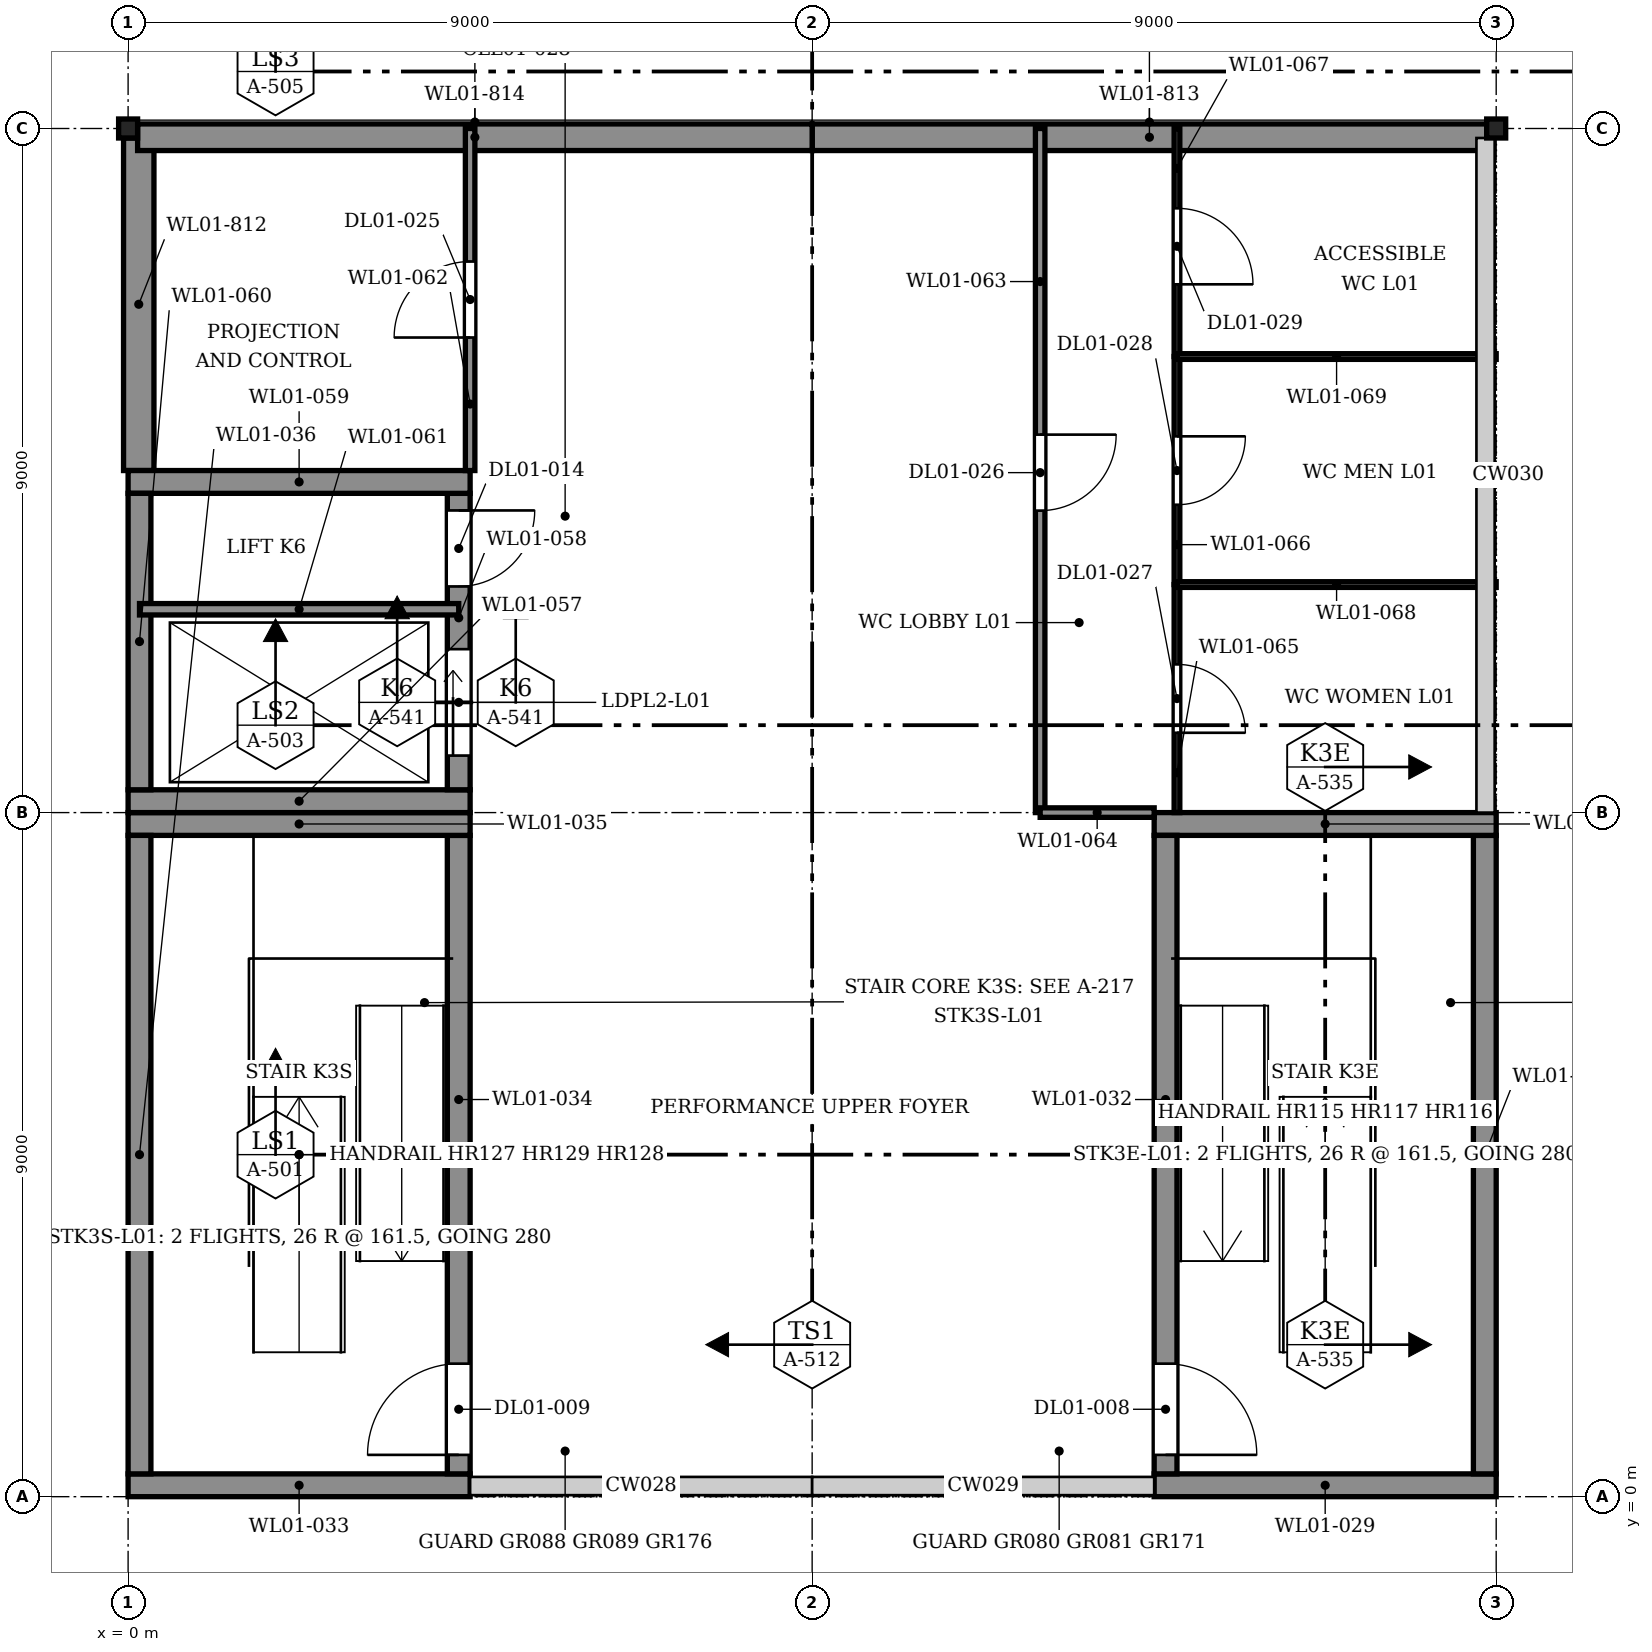
"""IFC4 building model, lengths in metres.
Left out: names, types, materials, properties, quantities, classifications, styles, units other than length and angle.
Written with IfcOpenShell. Run it as: python <this file> out.ifc"""

import sys

from ifc_helpers import new_model, si_unit, direction, frame, frame_2d, origin, origin_2d, place, context, subcontext, project, spatial, rectangle, hollow_rectangle, extrude, element, fill, save


model = new_model("IFC4")
c1 = context("Model", 3, precision=1e-05, world=origin(), true_north=direction((0.0, 1.0)))
c2 = subcontext(c1, "Body", "Model", "MODEL_VIEW")
j1 = project(units=[si_unit("LENGTHUNIT", "METRE"), si_unit("PLANEANGLEUNIT", "RADIAN")], contexts=[c1])
p1 = place(None, origin())
s1 = spatial("IfcSite", under=j1, at=p1, CompositionType="ELEMENT")
p2 = place(p1, origin())
s2 = spatial("IfcBuilding", under=s1, at=p2, CompositionType="ELEMENT")
p3 = place(p2, frame((0.0, 0.0, 5.0)))
s3 = spatial("IfcBuildingStorey", under=s2, at=p3, CompositionType="ELEMENT", Elevation=5.0)
for number, where, z_axis, x_axis in (
    (1, (0.0, 18.0, 0.0), (0.0, 0.0, 1.0), (1.0, 0.0, 0.0)),
    (2, (18.0, 18.0, 0.0), (0.0, 0.0, 1.0), (1.0, 0.0, 0.0)),
):
    element("IfcColumn", number, at=place(p3, frame(where, z_axis=z_axis, x_axis=x_axis)), inside=s3, PredefinedType="COLUMN", context=c2, shape_type="SweptSolid", body=[
        extrude(hollow_rectangle(XDim=0.25, YDim=0.25, WallThickness=0.01, InnerFilletRadius=0.015, OuterFilletRadius=0.025, at=origin_2d()), origin(), (0.0, 0.0, 1.0), 4.2),
    ])
p4 = place(p3, frame((0.14, 13.5, 0.0), z_axis=(0.0, 0.0, 1.0), x_axis=(0.0, 1.0, 0.0)))
e3 = element("IfcWall", 3, at=p4, inside=s3, PredefinedType="SOLIDWALL", context=c2, shape_type="SweptSolid", body=[
    extrude(rectangle(XDim=4.375, YDim=0.4, at=frame_2d((2.188, 0.0))), origin(), (0.0, 0.0, 1.0), 4.0),
])
for number, where, z_axis, x_axis in (
    (4, (9.0, 17.885, 0.0), (0.0, 0.0, 1.0), (1.0, 0.0, 0.0)),
    (5, (0.125, 17.885, 0.0), (0.0, 0.0, 1.0), (1.0, 0.0, 0.0)),
):
    element("IfcWall", number, at=place(p3, frame(where, z_axis=z_axis, x_axis=x_axis)), inside=s3, PredefinedType="SOLIDWALL", context=c2, shape_type="SweptSolid", body=[
        extrude(rectangle(XDim=8.875, YDim=0.35, at=frame_2d((4.438, 0.0))), origin(), (0.0, 0.0, 1.0), 2.824),
    ])
p5 = place(p3, frame((13.5, 0.15, 0.0), z_axis=(0.0, 0.0, 1.0), x_axis=(1.0, 0.0, 0.0)))
e6 = element("IfcWall", 6, at=p5, inside=s3, PredefinedType="SOLIDWALL", context=c2, shape_type="SweptSolid", body=[
    extrude(rectangle(XDim=4.5, YDim=0.3, at=frame_2d((2.25, 0.0))), origin(), (0.0, 0.0, 1.0), 4.2),
])
p6 = place(p3, frame((17.85, 0.3, 0.0), z_axis=(0.0, 0.0, 1.0), x_axis=(0.0, 1.0, 0.0)))
e7 = element("IfcWall", 7, at=p6, inside=s3, PredefinedType="SOLIDWALL", context=c2, shape_type="SweptSolid", body=[
    extrude(rectangle(XDim=8.4, YDim=0.3, at=frame_2d((4.2, 0.0))), origin(), (0.0, 0.0, 1.0), 4.2),
])
p7 = place(p3, frame((13.5, 8.85, 0.0), z_axis=(0.0, 0.0, 1.0), x_axis=(1.0, 0.0, 0.0)))
e8 = element("IfcWall", 8, at=p7, inside=s3, PredefinedType="SOLIDWALL", context=c2, shape_type="SweptSolid", body=[
    extrude(rectangle(XDim=4.5, YDim=0.3, at=frame_2d((2.25, 0.0))), origin(), (0.0, 0.0, 1.0), 4.2),
])
p8 = place(p3, frame((13.65, 0.3, 0.0), z_axis=(0.0, 0.0, 1.0), x_axis=(0.0, 1.0, 0.0)))
e9 = element("IfcWall", 9, at=p8, inside=s3, PredefinedType="SOLIDWALL", context=c2, shape_type="SweptSolid", body=[
    extrude(rectangle(XDim=8.4, YDim=0.3, at=frame_2d((4.2, 0.0))), origin(), (0.0, 0.0, 1.0), 4.2),
])
p9 = place(p8, frame((0.25, 0.0, 0.0)))
e10 = element("IfcOpeningElement", 10, at=p9, cuts=e9, PredefinedType="OPENING", context=c2, shape_type="SweptSolid", body=[
    extrude(rectangle(XDim=1.2, YDim=2.1, at=frame_2d((0.6, 1.05))), frame((0.0, 0.16, 0.0), z_axis=(0.0, -1.0, 0.0), x_axis=(1.0, 0.0, 0.0)), (0.0, 0.0, 1.0), 0.32),
])
p10 = place(p3, frame((0.0, 0.15, 0.0), z_axis=(0.0, 0.0, 1.0), x_axis=(1.0, 0.0, 0.0)))
e11 = element("IfcWall", 11, at=p10, inside=s3, PredefinedType="SOLIDWALL", context=c2, shape_type="SweptSolid", body=[
    extrude(rectangle(XDim=4.5, YDim=0.3, at=frame_2d((2.25, 0.0))), origin(), (0.0, 0.0, 1.0), 4.2),
])
p11 = place(p3, frame((4.35, 0.3, 0.0), z_axis=(0.0, 0.0, 1.0), x_axis=(0.0, 1.0, 0.0)))
e12 = element("IfcWall", 12, at=p11, inside=s3, PredefinedType="SOLIDWALL", context=c2, shape_type="SweptSolid", body=[
    extrude(rectangle(XDim=8.4, YDim=0.3, at=frame_2d((4.2, 0.0))), origin(), (0.0, 0.0, 1.0), 4.2),
])
p12 = place(p11, frame((0.25, 0.0, 0.0)))
e13 = element("IfcOpeningElement", 13, at=p12, cuts=e12, PredefinedType="OPENING", context=c2, shape_type="SweptSolid", body=[
    extrude(rectangle(XDim=1.2, YDim=2.1, at=frame_2d((0.6, 1.05))), frame((0.0, 0.16, 0.0), z_axis=(0.0, -1.0, 0.0), x_axis=(1.0, 0.0, 0.0)), (0.0, 0.0, 1.0), 0.32),
])
p13 = place(p3, frame((0.0, 8.85, 0.0), z_axis=(0.0, 0.0, 1.0), x_axis=(1.0, 0.0, 0.0)))
e14 = element("IfcWall", 14, at=p13, inside=s3, PredefinedType="SOLIDWALL", context=c2, shape_type="SweptSolid", body=[
    extrude(rectangle(XDim=4.5, YDim=0.3, at=frame_2d((2.25, 0.0))), origin(), (0.0, 0.0, 1.0), 4.2),
])
p14 = place(p3, frame((0.15, 0.3, 0.0), z_axis=(0.0, 0.0, 1.0), x_axis=(0.0, 1.0, 0.0)))
e15 = element("IfcWall", 15, at=p14, inside=s3, PredefinedType="SOLIDWALL", context=c2, shape_type="SweptSolid", body=[
    extrude(rectangle(XDim=8.4, YDim=0.3, at=frame_2d((4.2, 0.0))), origin(), (0.0, 0.0, 1.0), 4.2),
])
p15 = place(p3, frame((0.0, 9.15, 0.0), z_axis=(0.0, 0.0, 1.0), x_axis=(1.0, 0.0, 0.0)))
e16 = element("IfcWall", 16, at=p15, inside=s3, PredefinedType="SOLIDWALL", context=c2, shape_type="SweptSolid", body=[
    extrude(rectangle(XDim=4.5, YDim=0.3, at=frame_2d((2.25, 0.0))), origin(), (0.0, 0.0, 1.0), 4.2),
])
p16 = place(p3, frame((4.35, 9.3, 0.0), z_axis=(0.0, 0.0, 1.0), x_axis=(0.0, 1.0, 0.0)))
e17 = element("IfcWall", 17, at=p16, inside=s3, PredefinedType="SOLIDWALL", context=c2, shape_type="SweptSolid", body=[
    extrude(rectangle(XDim=3.9, YDim=0.3, at=frame_2d((1.95, 0.0))), origin(), (0.0, 0.0, 1.0), 4.2),
])
p17 = place(p16, frame((0.45, 0.0, 0.0)))
e18 = element("IfcOpeningElement", 18, at=p17, cuts=e17, PredefinedType="OPENING", context=c2, shape_type="SweptSolid", body=[
    extrude(rectangle(XDim=1.4, YDim=2.1, at=frame_2d((0.7, 1.05))), frame((0.0, 0.16, 0.0), z_axis=(0.0, -1.0, 0.0), x_axis=(1.0, 0.0, 0.0)), (0.0, 0.0, 1.0), 0.32),
])
p18 = place(p16, frame((2.675, 0.0, 0.0)))
e19 = element("IfcOpeningElement", 19, at=p18, cuts=e17, PredefinedType="OPENING", context=c2, shape_type="SweptSolid", body=[
    extrude(rectangle(XDim=1.0, YDim=2.1, at=frame_2d((0.5, 1.05))), frame((0.0, 0.16, 0.0), z_axis=(0.0, -1.0, 0.0), x_axis=(1.0, 0.0, 0.0)), (0.0, 0.0, 1.0), 0.32),
])
p19 = place(p3, frame((0.0, 13.35, 0.0), z_axis=(0.0, 0.0, 1.0), x_axis=(1.0, 0.0, 0.0)))
e20 = element("IfcWall", 20, at=p19, inside=s3, PredefinedType="SOLIDWALL", context=c2, shape_type="SweptSolid", body=[
    extrude(rectangle(XDim=4.5, YDim=0.3, at=frame_2d((2.25, 0.0))), origin(), (0.0, 0.0, 1.0), 4.2),
])
p20 = place(p3, frame((0.15, 9.3, 0.0), z_axis=(0.0, 0.0, 1.0), x_axis=(0.0, 1.0, 0.0)))
e21 = element("IfcWall", 21, at=p20, inside=s3, PredefinedType="SOLIDWALL", context=c2, shape_type="SweptSolid", body=[
    extrude(rectangle(XDim=3.9, YDim=0.3, at=frame_2d((1.95, 0.0))), origin(), (0.0, 0.0, 1.0), 4.2),
])
p21 = place(p3, frame((0.15, 11.675, 0.0), z_axis=(0.0, 0.0, 1.0), x_axis=(1.0, 0.0, 0.0)))
e22 = element("IfcWall", 22, at=p21, inside=s3, PredefinedType="SOLIDWALL", context=c2, shape_type="SweptSolid", body=[
    extrude(rectangle(XDim=4.2, YDim=0.15, at=frame_2d((2.1, 0.0))), origin(), (0.0, 0.0, 1.0), 4.2),
])
p22 = place(p2, origin())
s4 = spatial("IfcBuildingStorey", under=s2, at=p22, CompositionType="ELEMENT", Elevation=0.0)
p23 = place(p22, frame((4.5, 18.25, -0.038), z_axis=(0.0, 0.0, 1.0), x_axis=(1.0, 0.0, 0.0)))
e23 = element("IfcWall", 23, at=p23, inside=s4, PredefinedType="PARTITIONING", context=c2, shape_type="SweptSolid", body=[
    extrude(rectangle(XDim=7.5, YDim=0.3, at=frame_2d((3.75, 0.0))), origin(), (0.0, 0.0, 1.0), 12.428),
])
p24 = place(p23, frame((0.96, 0.0, 0.0)))
e24 = element("IfcOpeningElement", 24, at=p24, cuts=e23, PredefinedType="OPENING", context=c2, shape_type="SweptSolid", body=[
    extrude(rectangle(XDim=1.8, YDim=2.1, at=frame_2d((0.9, 1.05))), frame((0.0, 0.16, 0.0), z_axis=(0.0, -1.0, 0.0), x_axis=(1.0, 0.0, 0.0)), (0.0, 0.0, 1.0), 0.32),
])
p25 = place(p23, frame((4.76, 0.0, 0.0)))
e25 = element("IfcOpeningElement", 25, at=p25, cuts=e23, PredefinedType="OPENING", context=c2, shape_type="SweptSolid", body=[
    extrude(rectangle(XDim=1.8, YDim=2.1, at=frame_2d((0.9, 1.05))), frame((0.0, 0.16, 0.0), z_axis=(0.0, -1.0, 0.0), x_axis=(1.0, 0.0, 0.0)), (0.0, 0.0, 1.0), 0.32),
])
p26 = place(p22, frame((0.25, 18.25, -0.038), z_axis=(0.0, 0.0, 1.0), x_axis=(1.0, 0.0, 0.0)))
e26 = element("IfcWall", 26, at=p26, inside=s4, PredefinedType="PARTITIONING", context=c2, shape_type="SweptSolid", body=[
    extrude(rectangle(XDim=4.25, YDim=0.3, at=frame_2d((2.125, 0.0))), origin(), (0.0, 0.0, 1.0), 12.428),
])
p27 = place(p22, frame((12.0, 18.25, -0.038), z_axis=(0.0, 0.0, 1.0), x_axis=(1.0, 0.0, 0.0)))
e27 = element("IfcWall", 27, at=p27, inside=s4, PredefinedType="PARTITIONING", context=c2, shape_type="SweptSolid", body=[
    extrude(rectangle(XDim=1.8, YDim=0.3, at=frame_2d((0.9, 0.0))), origin(), (0.0, 0.0, 1.0), 12.428),
])
p28 = place(p22, frame((13.8, 18.25, -0.038), z_axis=(0.0, 0.0, 1.0), x_axis=(1.0, 0.0, 0.0)))
e28 = element("IfcWall", 28, at=p28, inside=s4, PredefinedType="PARTITIONING", context=c2, shape_type="SweptSolid", body=[
    extrude(rectangle(XDim=4.2, YDim=0.3, at=frame_2d((2.1, 0.0))), origin(), (0.0, 0.0, 1.0), 12.428),
])
p29 = place(p3, frame((4.5, 13.5, 0.0), z_axis=(0.0, 0.0, 1.0), x_axis=(0.0, 1.0, 0.0)))
e29 = element("IfcWall", 29, at=p29, inside=s3, PredefinedType="PARTITIONING", context=c2, shape_type="SweptSolid", body=[
    extrude(rectangle(XDim=4.5, YDim=0.125, at=frame_2d((2.25, 0.0))), origin(), (0.0, 0.0, 1.0), 2.824),
])
p30 = place(p29, frame((1.75, 0.0, 0.0)))
e30 = element("IfcOpeningElement", 30, at=p30, cuts=e29, PredefinedType="OPENING", context=c2, shape_type="SweptSolid", body=[
    extrude(rectangle(XDim=1.0, YDim=2.1, at=frame_2d((0.5, 1.05))), frame((0.0, 0.073, 0.0), z_axis=(0.0, -1.0, 0.0), x_axis=(1.0, 0.0, 0.0)), (0.0, 0.0, 1.0), 0.145),
])
p31 = place(p3, frame((12.0, 9.0, 0.0), z_axis=(0.0, 0.0, 1.0), x_axis=(0.0, 1.0, 0.0)))
e31 = element("IfcWall", 31, at=p31, inside=s3, PredefinedType="PARTITIONING", context=c2, shape_type="SweptSolid", body=[
    extrude(rectangle(XDim=9.0, YDim=0.125, at=frame_2d((4.5, 0.0))), origin(), (0.0, 0.0, 1.0), 2.824),
])
p32 = place(p31, frame((3.972, 0.0, 0.0)))
e32 = element("IfcOpeningElement", 32, at=p32, cuts=e31, PredefinedType="OPENING", context=c2, shape_type="SweptSolid", body=[
    extrude(rectangle(XDim=1.0, YDim=2.1, at=frame_2d((0.5, 1.05))), frame((0.0, 0.073, 0.0), z_axis=(0.0, -1.0, 0.0), x_axis=(1.0, 0.0, 0.0)), (0.0, 0.0, 1.0), 0.145),
])
p33 = place(p3, frame((12.0, 9.0, 0.0), z_axis=(0.0, 0.0, 1.0), x_axis=(1.0, 0.0, 0.0)))
e33 = element("IfcWall", 33, at=p33, inside=s3, PredefinedType="PARTITIONING", context=c2, shape_type="SweptSolid", body=[
    extrude(rectangle(XDim=1.5, YDim=0.125, at=frame_2d((0.75, 0.0))), origin(), (0.0, 0.0, 1.0), 3.208),
])
p34 = place(p3, frame((13.8, 9.0, 0.0), z_axis=(0.0, 0.0, 1.0), x_axis=(0.0, 1.0, 0.0)))
e34 = element("IfcWall", 34, at=p34, inside=s3, PredefinedType="PARTITIONING", context=c2, shape_type="SweptSolid", body=[
    extrude(rectangle(XDim=3.0, YDim=0.075, at=frame_2d((1.5, 0.0))), origin(), (0.0, 0.0, 1.0), 4.0),
])
p35 = place(p34, frame((1.05, 0.0, 0.0)))
e35 = element("IfcOpeningElement", 35, at=p35, cuts=e34, PredefinedType="OPENING", context=c2, shape_type="SweptSolid", body=[
    extrude(rectangle(XDim=0.9, YDim=2.1, at=frame_2d((0.45, 1.05))), frame((0.0, 0.047, 0.0), z_axis=(0.0, -1.0, 0.0), x_axis=(1.0, 0.0, 0.0)), (0.0, 0.0, 1.0), 0.095),
])
p36 = place(p3, frame((13.8, 12.0, 0.0), z_axis=(0.0, 0.0, 1.0), x_axis=(0.0, 1.0, 0.0)))
e36 = element("IfcWall", 36, at=p36, inside=s3, PredefinedType="PARTITIONING", context=c2, shape_type="SweptSolid", body=[
    extrude(rectangle(XDim=3.0, YDim=0.075, at=frame_2d((1.5, 0.0))), origin(), (0.0, 0.0, 1.0), 4.0),
])
p37 = place(p36, frame((1.05, 0.0, 0.0)))
e37 = element("IfcOpeningElement", 37, at=p37, cuts=e36, PredefinedType="OPENING", context=c2, shape_type="SweptSolid", body=[
    extrude(rectangle(XDim=0.9, YDim=2.1, at=frame_2d((0.45, 1.05))), frame((0.0, 0.047, 0.0), z_axis=(0.0, -1.0, 0.0), x_axis=(1.0, 0.0, 0.0)), (0.0, 0.0, 1.0), 0.095),
])
p38 = place(p3, frame((13.8, 15.0, 0.0), z_axis=(0.0, 0.0, 1.0), x_axis=(0.0, 1.0, 0.0)))
e38 = element("IfcWall", 38, at=p38, inside=s3, PredefinedType="PARTITIONING", context=c2, shape_type="SweptSolid", body=[
    extrude(rectangle(XDim=3.0, YDim=0.075, at=frame_2d((1.5, 0.0))), origin(), (0.0, 0.0, 1.0), 2.824),
])
p39 = place(p38, frame((0.95, 0.0, 0.0)))
e39 = element("IfcOpeningElement", 39, at=p39, cuts=e38, PredefinedType="OPENING", context=c2, shape_type="SweptSolid", body=[
    extrude(rectangle(XDim=1.0, YDim=2.1, at=frame_2d((0.5, 1.05))), frame((0.0, 0.047, 0.0), z_axis=(0.0, -1.0, 0.0), x_axis=(1.0, 0.0, 0.0)), (0.0, 0.0, 1.0), 0.095),
])
for number, where, z_axis, x_axis in (
    (40, (13.8, 12.0, 0.0), (0.0, 0.0, 1.0), (1.0, 0.0, 0.0)),
    (41, (13.8, 15.0, 0.0), (0.0, 0.0, 1.0), (1.0, 0.0, 0.0)),
):
    element("IfcWall", number, at=place(p3, frame(where, z_axis=z_axis, x_axis=x_axis)), inside=s3, PredefinedType="PARTITIONING", context=c2, shape_type="SweptSolid", body=[
        extrude(rectangle(XDim=4.2, YDim=0.075, at=frame_2d((2.1, 0.0))), origin(), (0.0, 0.0, 1.0), 3.3),
    ])
p40 = place(p9, frame((1.2, 0.0, 0.0), z_axis=(0.0, 0.0, 1.0), x_axis=(-1.0, 0.0, 0.0)))
e42 = element("IfcDoor", 42, at=p40, inside=s3, OperationType="SINGLE_SWING_LEFT", PredefinedType="DOOR", context=c2, shape_type="SweptSolid", body=[
    extrude(rectangle(XDim=1.2, YDim=2.1, at=frame_2d((0.6, 1.05))), frame((0.0, 0.025, 0.0), z_axis=(0.0, -1.0, 0.0), x_axis=(1.0, 0.0, 0.0)), (0.0, 0.0, 1.0), 0.05),
])
fill(e10, e42)
p41 = place(p12, origin())
e43 = element("IfcDoor", 43, at=p41, inside=s3, OperationType="SINGLE_SWING_RIGHT", PredefinedType="DOOR", context=c2, shape_type="SweptSolid", body=[
    extrude(rectangle(XDim=1.2, YDim=2.1, at=frame_2d((0.6, 1.05))), frame((0.0, 0.025, 0.0), z_axis=(0.0, -1.0, 0.0), x_axis=(1.0, 0.0, 0.0)), (0.0, 0.0, 1.0), 0.05),
])
fill(e13, e43)
p42 = place(p17, origin())
e44 = element("IfcDoor", 44, at=p42, inside=s3, OperationType="SLIDING_TO_LEFT", PredefinedType="DOOR", context=c2, shape_type="SweptSolid", body=[
    extrude(rectangle(XDim=1.4, YDim=2.1, at=frame_2d((0.7, 1.05))), frame((0.0, 0.025, 0.0), z_axis=(0.0, -1.0, 0.0), x_axis=(1.0, 0.0, 0.0)), (0.0, 0.0, 1.0), 0.05),
])
fill(e18, e44)
p43 = place(p18, frame((1.0, 0.0, 0.0), z_axis=(0.0, 0.0, 1.0), x_axis=(-1.0, 0.0, 0.0)))
e45 = element("IfcDoor", 45, at=p43, inside=s3, OperationType="SINGLE_SWING_RIGHT", PredefinedType="DOOR", context=c2, shape_type="SweptSolid", body=[
    extrude(rectangle(XDim=1.0, YDim=2.1, at=frame_2d((0.5, 1.05))), frame((0.0, 0.025, 0.0), z_axis=(0.0, -1.0, 0.0), x_axis=(1.0, 0.0, 0.0)), (0.0, 0.0, 1.0), 0.05),
])
fill(e19, e45)
p44 = place(p30, origin())
e46 = element("IfcDoor", 46, at=p44, inside=s3, OperationType="SINGLE_SWING_RIGHT", PredefinedType="DOOR", context=c2, shape_type="SweptSolid", body=[
    extrude(rectangle(XDim=1.0, YDim=2.1, at=frame_2d((0.5, 1.05))), frame((0.0, 0.025, 0.0), z_axis=(0.0, -1.0, 0.0), x_axis=(1.0, 0.0, 0.0)), (0.0, 0.0, 1.0), 0.05),
])
fill(e30, e46)
p45 = place(p32, frame((1.0, 0.0, 0.0), z_axis=(0.0, 0.0, 1.0), x_axis=(-1.0, 0.0, 0.0)))
e47 = element("IfcDoor", 47, at=p45, inside=s3, OperationType="SINGLE_SWING_RIGHT", PredefinedType="DOOR", context=c2, shape_type="SweptSolid", body=[
    extrude(rectangle(XDim=1.0, YDim=2.1, at=frame_2d((0.5, 1.05))), frame((0.0, 0.025, 0.0), z_axis=(0.0, -1.0, 0.0), x_axis=(1.0, 0.0, 0.0)), (0.0, 0.0, 1.0), 0.05),
])
fill(e32, e47)
p46 = place(p35, frame((0.9, 0.0, 0.0), z_axis=(0.0, 0.0, 1.0), x_axis=(-1.0, 0.0, 0.0)))
e48 = element("IfcDoor", 48, at=p46, inside=s3, OperationType="SINGLE_SWING_LEFT", PredefinedType="DOOR", context=c2, shape_type="SweptSolid", body=[
    extrude(rectangle(XDim=0.9, YDim=2.1, at=frame_2d((0.45, 1.05))), frame((0.0, 0.025, 0.0), z_axis=(0.0, -1.0, 0.0), x_axis=(1.0, 0.0, 0.0)), (0.0, 0.0, 1.0), 0.05),
])
fill(e35, e48)
p47 = place(p37, frame((0.9, 0.0, 0.0), z_axis=(0.0, 0.0, 1.0), x_axis=(-1.0, 0.0, 0.0)))
e49 = element("IfcDoor", 49, at=p47, inside=s3, OperationType="SINGLE_SWING_RIGHT", PredefinedType="DOOR", context=c2, shape_type="SweptSolid", body=[
    extrude(rectangle(XDim=0.9, YDim=2.1, at=frame_2d((0.45, 1.05))), frame((0.0, 0.025, 0.0), z_axis=(0.0, -1.0, 0.0), x_axis=(1.0, 0.0, 0.0)), (0.0, 0.0, 1.0), 0.05),
])
fill(e37, e49)
p48 = place(p39, frame((1.0, 0.0, 0.0), z_axis=(0.0, 0.0, 1.0), x_axis=(-1.0, 0.0, 0.0)))
e50 = element("IfcDoor", 50, at=p48, inside=s3, OperationType="SINGLE_SWING_LEFT", PredefinedType="DOOR", context=c2, shape_type="SweptSolid", body=[
    extrude(rectangle(XDim=1.0, YDim=2.1, at=frame_2d((0.5, 1.05))), frame((0.0, 0.025, 0.0), z_axis=(0.0, -1.0, 0.0), x_axis=(1.0, 0.0, 0.0)), (0.0, 0.0, 1.0), 0.05),
])
fill(e39, e50)
save(model, sys.argv[1])
